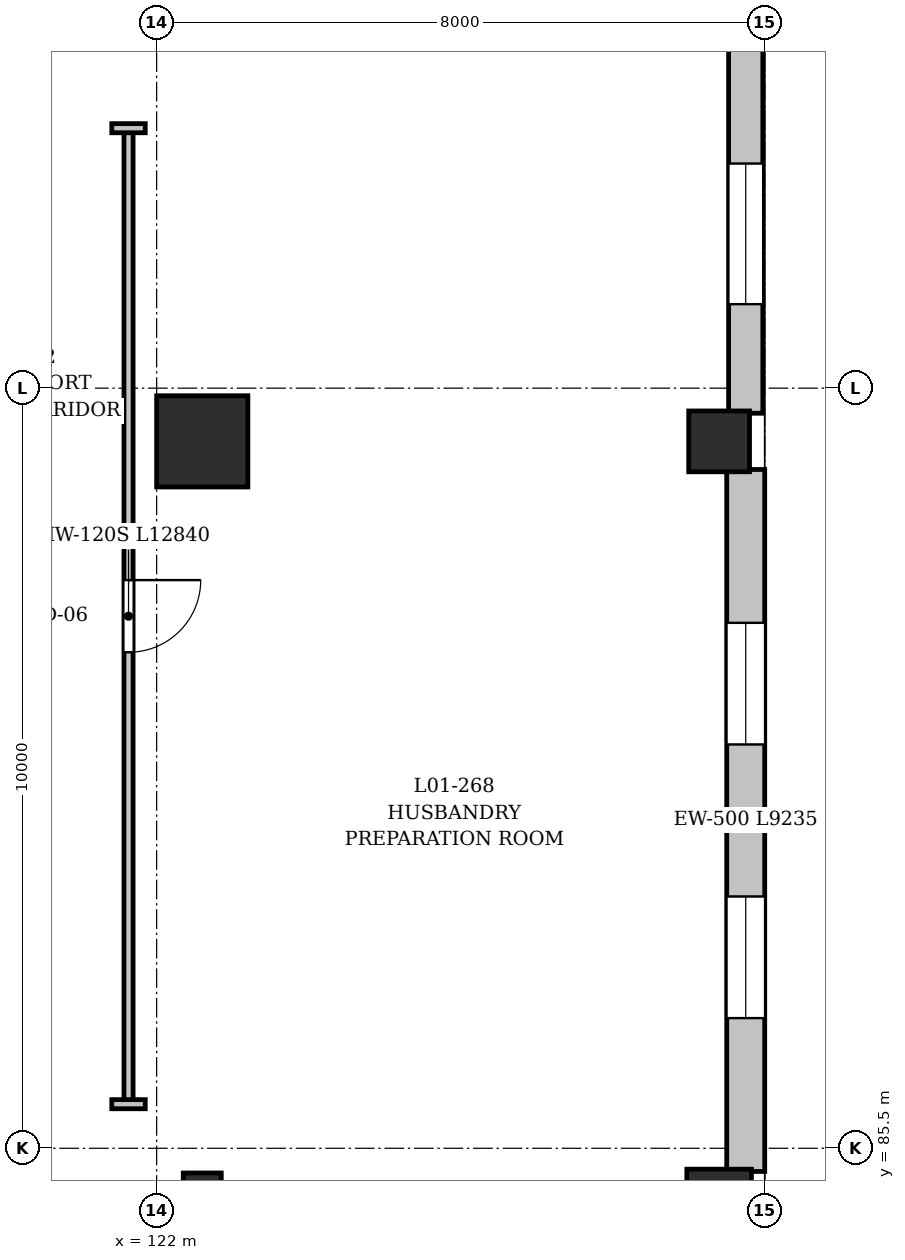
"""IFC4 building model, lengths in metres.
Left out: names, types, materials, properties, quantities, classifications, styles, units other than length and angle.
Written with IfcOpenShell. Run it as: python <this file> out.ifc"""

import sys

from ifc_helpers import new_model, si_unit, direction, frame, frame_2d, origin, origin_2d, place, context, subcontext, project, spatial, rectangle, extrude, element, fill, save


model = new_model("IFC4")
c1 = context("Model", 3, precision=1e-05, world=origin(), true_north=direction((0.0, 1.0)))
c2 = subcontext(c1, "Body", "Model", "MODEL_VIEW")
j1 = project(units=[si_unit("LENGTHUNIT", "METRE"), si_unit("PLANEANGLEUNIT", "RADIAN")], contexts=[c1])
p1 = place(None, origin())
s1 = spatial("IfcSite", under=j1, at=p1, CompositionType="ELEMENT")
p2 = place(p1, origin())
s2 = spatial("IfcBuilding", under=s1, at=p2, CompositionType="ELEMENT")
p3 = place(p2, origin())
s3 = spatial("IfcBuildingStorey", under=s2, at=p3, CompositionType="ELEMENT", Elevation=0.0)
p4 = place(p3, frame((122.6, 84.8, 0.0), z_axis=(0.0, 0.0, 1.0), x_axis=(1.0, 0.0, 0.0)))
e1 = element("IfcColumn", 1, at=p4, inside=s3, PredefinedType="COLUMN", context=c2, shape_type="SweptSolid", body=[
    extrude(rectangle(XDim=0.5, YDim=0.75, at=origin_2d()), origin(), (0.0, 0.0, 1.0), 5.05),
])
p5 = place(p3, frame((122.6, 94.8, 0.0), z_axis=(0.0, 0.0, 1.0), x_axis=(1.0, 0.0, 0.0)))
e2 = element("IfcColumn", 2, at=p5, inside=s3, PredefinedType="COLUMN", context=c2, shape_type="SweptSolid", body=[
    extrude(rectangle(XDim=1.2, YDim=1.2, at=origin_2d()), origin(), (0.0, 0.0, 1.0), 5.05),
])
p6 = place(p3, frame((129.4, 84.8, 0.0), z_axis=(0.0, 0.0, 1.0), x_axis=(1.0, 0.0, 0.0)))
e3 = element("IfcColumn", 3, at=p6, inside=s3, PredefinedType="COLUMN", context=c2, shape_type="SweptSolid", body=[
    extrude(rectangle(XDim=0.85, YDim=0.85, at=origin_2d()), origin(), (0.0, 0.0, 1.0), 5.05),
])
p7 = place(p3, frame((129.4, 94.8, 0.0), z_axis=(0.0, 0.0, 1.0), x_axis=(1.0, 0.0, 0.0)))
e4 = element("IfcColumn", 4, at=p7, inside=s3, PredefinedType="COLUMN", context=c2, shape_type="SweptSolid", body=[
    extrude(rectangle(XDim=0.8, YDim=0.8, at=origin_2d()), origin(), (0.0, 0.0, 1.0), 5.05),
])
p8 = place(p3, frame((129.75, 112.25, 0.0), z_axis=(0.0, 0.0, 1.0), x_axis=(0.0, -1.0, 0.0)))
e5 = element("IfcWall", 5, at=p8, inside=s3, PredefinedType="SOLIDWALL", context=c2, shape_type="SweptSolid", body=[
    extrude(rectangle(XDim=17.08, YDim=0.45, at=frame_2d((8.54, 0.0))), origin(), (0.0, 0.0, 1.0), 3.84),
])
p9 = place(p8, frame((2.215, 0.0, 0.9)))
e6 = element("IfcOpeningElement", 6, at=p9, cuts=e5, PredefinedType="OPENING", context=c2, shape_type="SweptSolid", body=[
    extrude(rectangle(XDim=1.85, YDim=1.5, at=frame_2d((0.925, 0.75))), frame((0.0, 0.235, 0.0), z_axis=(0.0, -1.0, 0.0), x_axis=(1.0, 0.0, 0.0)), (0.0, 0.0, 1.0), 0.47),
])
p10 = place(p8, frame((5.815, 0.0, 0.9)))
e7 = element("IfcOpeningElement", 7, at=p10, cuts=e5, PredefinedType="OPENING", context=c2, shape_type="SweptSolid", body=[
    extrude(rectangle(XDim=1.85, YDim=1.5, at=frame_2d((0.925, 0.75))), frame((0.0, 0.235, 0.0), z_axis=(0.0, -1.0, 0.0), x_axis=(1.0, 0.0, 0.0)), (0.0, 0.0, 1.0), 0.47),
])
p11 = place(p8, frame((9.415, 0.0, 0.9)))
e8 = element("IfcOpeningElement", 8, at=p11, cuts=e5, PredefinedType="OPENING", context=c2, shape_type="SweptSolid", body=[
    extrude(rectangle(XDim=1.85, YDim=1.5, at=frame_2d((0.925, 0.75))), frame((0.0, 0.235, 0.0), z_axis=(0.0, -1.0, 0.0), x_axis=(1.0, 0.0, 0.0)), (0.0, 0.0, 1.0), 0.47),
])
p12 = place(p8, frame((13.795, 0.0, 0.9)))
e9 = element("IfcOpeningElement", 9, at=p12, cuts=e5, PredefinedType="OPENING", context=c2, shape_type="SweptSolid", body=[
    extrude(rectangle(XDim=1.85, YDim=1.5, at=frame_2d((0.925, 0.75))), frame((0.0, 0.235, 0.0), z_axis=(0.0, -1.0, 0.0), x_axis=(1.0, 0.0, 0.0)), (0.0, 0.0, 1.0), 0.47),
])
p13 = place(p3, frame((129.75, 94.43, 0.0), z_axis=(0.0, 0.0, 1.0), x_axis=(0.0, -1.0, 0.0)))
e10 = element("IfcWall", 10, at=p13, inside=s3, PredefinedType="SOLIDWALL", context=c2, shape_type="SweptSolid", body=[
    extrude(rectangle(XDim=9.235, YDim=0.5, at=frame_2d((4.617, 0.0))), origin(), (0.0, 0.0, 1.0), 3.74),
])
p14 = place(p13, frame((2.018, 0.0, 0.9)))
e11 = element("IfcOpeningElement", 11, at=p14, cuts=e10, PredefinedType="OPENING", context=c2, shape_type="SweptSolid", body=[
    extrude(rectangle(XDim=1.6, YDim=1.6, at=frame_2d((0.8, 0.8))), frame((0.0, 0.26, 0.0), z_axis=(0.0, -1.0, 0.0), x_axis=(1.0, 0.0, 0.0)), (0.0, 0.0, 1.0), 0.52),
])
p15 = place(p13, frame((5.617, 0.0, 0.9)))
e12 = element("IfcOpeningElement", 12, at=p15, cuts=e10, PredefinedType="OPENING", context=c2, shape_type="SweptSolid", body=[
    extrude(rectangle(XDim=1.6, YDim=1.6, at=frame_2d((0.8, 0.8))), frame((0.0, 0.26, 0.0), z_axis=(0.0, -1.0, 0.0), x_axis=(1.0, 0.0, 0.0)), (0.0, 0.0, 1.0), 0.52),
])
p16 = place(p3, frame((121.63, 98.92, 0.0), z_axis=(0.0, 0.0, 1.0), x_axis=(0.0, -1.0, 0.0)))
e13 = element("IfcWall", 13, at=p16, inside=s3, PredefinedType="PARTITIONING", context=c2, shape_type="SweptSolid", body=[
    extrude(rectangle(XDim=12.84, YDim=0.12, at=frame_2d((6.42, 0.0))), origin(), (0.0, 0.0, 1.0), 4.14),
])
p17 = place(p16, frame((5.945, 0.0, 0.0)))
e14 = element("IfcOpeningElement", 14, at=p17, cuts=e13, PredefinedType="OPENING", context=c2, shape_type="SweptSolid", body=[
    extrude(rectangle(XDim=0.95, YDim=2.2, at=frame_2d((0.475, 1.1))), frame((0.0, 0.07, 0.0), z_axis=(0.0, -1.0, 0.0), x_axis=(1.0, 0.0, 0.0)), (0.0, 0.0, 1.0), 0.14),
])
for number, where, z_axis, x_axis in (
    (15, (121.41, 98.92, 0.0), (0.0, 0.0, 1.0), (1.0, 0.0, 0.0)),
    (16, (121.41, 86.08, 0.0), (0.0, 0.0, 1.0), (1.0, 0.0, 0.0)),
):
    element("IfcWall", number, at=place(p3, frame(where, z_axis=z_axis, x_axis=x_axis)), inside=s3, PredefinedType="PARTITIONING", context=c2, shape_type="SweptSolid", body=[
        extrude(rectangle(XDim=0.44, YDim=0.12, at=frame_2d((0.22, 0.0))), origin(), (0.0, 0.0, 1.0), 5.05),
    ])
p18 = place(p12, origin())
e17 = element("IfcWindow", 17, at=p18, inside=s3, PartitioningType="DOUBLE_PANEL_VERTICAL", PredefinedType="WINDOW", context=c2, shape_type="SweptSolid", body=[
    extrude(rectangle(XDim=1.85, YDim=1.5, at=frame_2d((0.925, 0.75))), frame((0.0, 0.03, 0.0), z_axis=(0.0, -1.0, 0.0), x_axis=(1.0, 0.0, 0.0)), (0.0, 0.0, 1.0), 0.06),
])
fill(e9, e17)
p19 = place(p14, origin())
e18 = element("IfcWindow", 18, at=p19, inside=s3, PartitioningType="DOUBLE_PANEL_VERTICAL", PredefinedType="WINDOW", context=c2, shape_type="SweptSolid", body=[
    extrude(rectangle(XDim=1.6, YDim=1.6, at=frame_2d((0.8, 0.8))), frame((0.0, 0.03, 0.0), z_axis=(0.0, -1.0, 0.0), x_axis=(1.0, 0.0, 0.0)), (0.0, 0.0, 1.0), 0.06),
])
fill(e11, e18)
p20 = place(p15, origin())
e19 = element("IfcWindow", 19, at=p20, inside=s3, PartitioningType="DOUBLE_PANEL_VERTICAL", PredefinedType="WINDOW", context=c2, shape_type="SweptSolid", body=[
    extrude(rectangle(XDim=1.6, YDim=1.6, at=frame_2d((0.8, 0.8))), frame((0.0, 0.03, 0.0), z_axis=(0.0, -1.0, 0.0), x_axis=(1.0, 0.0, 0.0)), (0.0, 0.0, 1.0), 0.06),
])
fill(e12, e19)
p21 = place(p17, origin())
e20 = element("IfcDoor", 20, at=p21, inside=s3, OperationType="SINGLE_SWING_LEFT", PredefinedType="DOOR", context=c2, shape_type="SweptSolid", body=[
    extrude(rectangle(XDim=0.95, YDim=2.2, at=frame_2d((0.475, 1.1))), frame((0.0, 0.025, 0.0), z_axis=(0.0, -1.0, 0.0), x_axis=(1.0, 0.0, 0.0)), (0.0, 0.0, 1.0), 0.05),
])
fill(e14, e20)
save(model, sys.argv[1])
